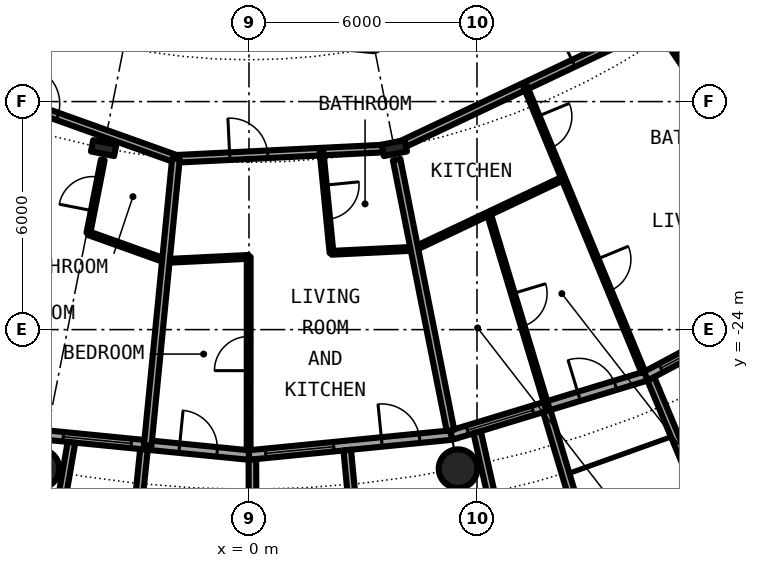
"""IFC4 building model, lengths in metres.
Left out: names, types, materials, properties, quantities, classifications, styles, units other than length and angle.
Written with IfcOpenShell. Run it as: python <this file> out.ifc"""

import sys

from ifc_helpers import new_model, si_unit, direction, frame, frame_2d, origin, origin_2d, place, context, subcontext, project, spatial, rectangle, hollow_circle, i_section, extrude, element, fill, save


model = new_model("IFC4")
c1 = context("Model", 3, precision=1e-05, world=origin(), true_north=direction((0.0, 1.0)))
c2 = subcontext(c1, "Body", "Model", "MODEL_VIEW")
j1 = project(units=[si_unit("LENGTHUNIT", "METRE"), si_unit("PLANEANGLEUNIT", "RADIAN")], contexts=[c1])
p1 = place(None, origin())
s1 = spatial("IfcSite", under=j1, at=p1, CompositionType="ELEMENT")
p2 = place(p1, origin())
s2 = spatial("IfcBuilding", under=s1, at=p2, CompositionType="ELEMENT")
p3 = place(p2, frame((0.0, 0.0, 22.8)))
s3 = spatial("IfcBuildingStorey", under=s2, at=p3, CompositionType="ELEMENT", Elevation=22.8)
for number, where, z_axis, x_axis in (
    (1, (-5.501, -27.658, 0.0), (0.0, 0.0, 1.0), (1.0, 0.0, 0.0)),
    (2, (5.501, -27.658, 0.0), (0.0, 0.0, 1.0), (1.0, 0.0, 0.0)),
):
    element("IfcColumn", number, at=place(p3, frame(where, z_axis=z_axis, x_axis=x_axis)), inside=s3, PredefinedType="COLUMN", context=c2, shape_type="SweptSolid", body=[
        extrude(hollow_circle(Radius=0.508, WallThickness=0.05, at=origin_2d()), origin(), (0.0, 0.0, 1.0), 3.05),
    ])
for number, where, z_axis, x_axis in (
    (3, (-3.824, -19.223, 0.0), (0.0, 0.0, 1.0), (-0.195, -0.981, 0.0)),
    (4, (3.824, -19.223, 0.0), (0.0, 0.0, 1.0), (0.195, -0.981, 0.0)),
):
    element("IfcColumn", number, at=place(p3, frame(where, z_axis=z_axis, x_axis=x_axis)), inside=s3, PredefinedType="COLUMN", context=c2, shape_type="SweptSolid", body=[
        extrude(i_section(OverallWidth=0.305, OverallDepth=0.62, WebThickness=0.021, FlangeThickness=0.04, FilletRadius=0.027, at=origin_2d()), origin(), (0.0, 0.0, 1.0), 3.05),
    ])
p4 = place(p3, frame((-5.326, -26.775, 0.0), z_axis=(0.0, 0.0, 1.0), x_axis=(0.995173996315, -0.098126026407, 0.0)))
e5 = element("IfcWall", 5, at=p4, inside=s3, PredefinedType="SOLIDWALL", context=c2, shape_type="SweptSolid", body=[
    extrude(rectangle(XDim=5.352, YDim=0.25, at=frame_2d((2.676, 0.0))), origin(), (0.0, 0.0, 1.0), 2.7),
])
p5 = place(p4, frame((0.441, 0.0, 0.3)))
e6 = element("IfcOpeningElement", 6, at=p5, cuts=e5, PredefinedType="OPENING", context=c2, shape_type="SweptSolid", body=[
    extrude(rectangle(XDim=1.8, YDim=2.1, at=frame_2d((0.9, 1.05))), frame((0.0, 0.135, 0.0), z_axis=(0.0, -1.0, 0.0), x_axis=(1.0, 0.0, 0.0)), (0.0, 0.0, 1.0), 0.27),
])
p6 = place(p4, frame((3.51, 0.0, 0.0)))
e7 = element("IfcOpeningElement", 7, at=p6, cuts=e5, PredefinedType="OPENING", context=c2, shape_type="SweptSolid", body=[
    extrude(rectangle(XDim=1.0, YDim=2.2, at=frame_2d((0.5, 1.1))), frame((0.0, 0.135, 0.0), z_axis=(0.0, -1.0, 0.0), x_axis=(1.0, 0.0, 0.0)), (0.0, 0.0, 1.0), 0.27),
])
p7 = place(p3, frame((-4.671, -26.966, -0.03), z_axis=(0.0, 0.0, 1.0), x_axis=(-0.170539878907, -0.985350774954, 0.0)))
e8 = element("IfcWall", 8, at=p7, inside=s3, PredefinedType="SOLIDWALL", context=c2, shape_type="SweptSolid", body=[
    extrude(rectangle(XDim=2.932, YDim=0.2, at=frame_2d((1.466, 0.0))), origin(), (0.0, 0.0, 1.0), 2.73),
])
p8 = place(p3, frame((-2.764, -27.153, -0.03), z_axis=(0.0, 0.0, 1.0), x_axis=(-0.101505487237, -0.994834979311, 0.0)))
e9 = element("IfcWall", 9, at=p8, inside=s3, PredefinedType="SOLIDWALL", context=c2, shape_type="SweptSolid", body=[
    extrude(rectangle(XDim=3.007, YDim=0.2, at=frame_2d((1.503, 0.0))), origin(), (0.0, 0.0, 1.0), 2.73),
])
p9 = place(p3, frame((0.0, -27.3, 0.0), z_axis=(0.0, 0.0, 1.0), x_axis=(0.995173996315, 0.098126026407, 0.0)))
e10 = element("IfcWall", 10, at=p9, inside=s3, PredefinedType="SOLIDWALL", context=c2, shape_type="SweptSolid", body=[
    extrude(rectangle(XDim=5.352, YDim=0.25, at=frame_2d((2.676, 0.0))), origin(), (0.0, 0.0, 1.0), 2.7),
])
p10 = place(p9, frame((0.441, 0.0, 0.3)))
e11 = element("IfcOpeningElement", 11, at=p10, cuts=e10, PredefinedType="OPENING", context=c2, shape_type="SweptSolid", body=[
    extrude(rectangle(XDim=1.8, YDim=2.1, at=frame_2d((0.9, 1.05))), frame((0.0, 0.135, 0.0), z_axis=(0.0, -1.0, 0.0), x_axis=(1.0, 0.0, 0.0)), (0.0, 0.0, 1.0), 0.27),
])
p11 = place(p9, frame((3.51, 0.0, 0.0)))
e12 = element("IfcOpeningElement", 12, at=p11, cuts=e10, PredefinedType="OPENING", context=c2, shape_type="SweptSolid", body=[
    extrude(rectangle(XDim=1.0, YDim=2.2, at=frame_2d((0.5, 1.1))), frame((0.0, 0.135, 0.0), z_axis=(0.0, -1.0, 0.0), x_axis=(1.0, 0.0, 0.0)), (0.0, 0.0, 1.0), 0.27),
])
p12 = place(p3, frame((0.09, -27.417, -0.03), z_axis=(0.0, 0.0, 1.0), x_axis=(0.00347308367, -0.999993968827, 0.0)))
e13 = element("IfcWall", 13, at=p12, inside=s3, PredefinedType="SOLIDWALL", context=c2, shape_type="SweptSolid", body=[
    extrude(rectangle(XDim=2.882, YDim=0.2, at=frame_2d((1.441, 0.0))), origin(), (0.0, 0.0, 1.0), 2.73),
])
p13 = place(p3, frame((2.586, -27.171, -0.03), z_axis=(0.0, 0.0, 1.0), x_axis=(0.094548432284, -0.995520262954, 0.0)))
e14 = element("IfcWall", 14, at=p13, inside=s3, PredefinedType="SOLIDWALL", context=c2, shape_type="SweptSolid", body=[
    extrude(rectangle(XDim=3.006, YDim=0.2, at=frame_2d((1.503, 0.0))), origin(), (0.0, 0.0, 1.0), 2.73),
])
p14 = place(p3, frame((5.326, -26.775, 0.0), z_axis=(0.0, 0.0, 1.0), x_axis=(0.956965678721, 0.290201119486, 0.0)))
e15 = element("IfcWall", 15, at=p14, inside=s3, PredefinedType="SOLIDWALL", context=c2, shape_type="SweptSolid", body=[
    extrude(rectangle(XDim=5.351, YDim=0.25, at=frame_2d((2.676, 0.0))), origin(), (0.0, 0.0, 1.0), 2.7),
])
p15 = place(p14, frame((0.441, 0.0, 0.3)))
e16 = element("IfcOpeningElement", 16, at=p15, cuts=e15, PredefinedType="OPENING", context=c2, shape_type="SweptSolid", body=[
    extrude(rectangle(XDim=1.8, YDim=2.1, at=frame_2d((0.9, 1.05))), frame((0.0, 0.135, 0.0), z_axis=(0.0, -1.0, 0.0), x_axis=(1.0, 0.0, 0.0)), (0.0, 0.0, 1.0), 0.27),
])
p16 = place(p14, frame((3.51, 0.0, 0.0)))
e17 = element("IfcOpeningElement", 17, at=p16, cuts=e15, PredefinedType="OPENING", context=c2, shape_type="SweptSolid", body=[
    extrude(rectangle(XDim=1.0, YDim=2.2, at=frame_2d((0.5, 1.1))), frame((0.0, 0.135, 0.0), z_axis=(0.0, -1.0, 0.0), x_axis=(1.0, 0.0, 0.0)), (0.0, 0.0, 1.0), 0.27),
])
p17 = place(p3, frame((6.004, -26.7, -0.03), z_axis=(0.0, 0.0, 1.0), x_axis=(0.219609259383, -0.975587911566, 0.0)))
e18 = element("IfcWall", 18, at=p17, inside=s3, PredefinedType="SOLIDWALL", context=c2, shape_type="SweptSolid", body=[
    extrude(rectangle(XDim=2.933, YDim=0.2, at=frame_2d((1.466, 0.0))), origin(), (0.0, 0.0, 1.0), 2.73),
])
p18 = place(p3, frame((7.837, -26.144, -0.03), z_axis=(0.0, 0.0, 1.0), x_axis=(0.287064767992, -0.957911174889, 0.0)))
e19 = element("IfcWall", 19, at=p18, inside=s3, PredefinedType="SOLIDWALL", context=c2, shape_type="SweptSolid", body=[
    extrude(rectangle(XDim=3.006, YDim=0.2, at=frame_2d((1.503, 0.0))), origin(), (0.0, 0.0, 1.0), 2.73),
])
p19 = place(p3, frame((10.447, -25.222, 0.0), z_axis=(0.0, 0.0, 1.0), x_axis=(0.881915646801, 0.471407246368, 0.0)))
e20 = element("IfcWall", 20, at=p19, inside=s3, PredefinedType="SOLIDWALL", context=c2, shape_type="SweptSolid", body=[
    extrude(rectangle(XDim=5.352, YDim=0.25, at=frame_2d((2.676, 0.0))), origin(), (0.0, 0.0, 1.0), 2.7),
])
p20 = place(p19, frame((0.441, 0.0, 0.3)))
e21 = element("IfcOpeningElement", 21, at=p20, cuts=e20, PredefinedType="OPENING", context=c2, shape_type="SweptSolid", body=[
    extrude(rectangle(XDim=1.8, YDim=2.1, at=frame_2d((0.9, 1.05))), frame((0.0, 0.135, 0.0), z_axis=(0.0, -1.0, 0.0), x_axis=(1.0, 0.0, 0.0)), (0.0, 0.0, 1.0), 0.27),
])
p21 = place(p19, frame((3.51, 0.0, 0.0)))
e22 = element("IfcOpeningElement", 22, at=p21, cuts=e20, PredefinedType="OPENING", context=c2, shape_type="SweptSolid", body=[
    extrude(rectangle(XDim=1.0, YDim=2.2, at=frame_2d((0.5, 1.1))), frame((0.0, 0.135, 0.0), z_axis=(0.0, -1.0, 0.0), x_axis=(1.0, 0.0, 0.0)), (0.0, 0.0, 1.0), 0.27),
])
p22 = place(p3, frame((10.575, -25.295, -0.03), z_axis=(0.0, 0.0, 1.0), x_axis=(0.385697364644, -0.922625353492, 0.0)))
e23 = element("IfcWall", 23, at=p22, inside=s3, PredefinedType="SOLIDWALL", context=c2, shape_type="SweptSolid", body=[
    extrude(rectangle(XDim=2.883, YDim=0.2, at=frame_2d((1.442, 0.0))), origin(), (0.0, 0.0, 1.0), 2.73),
])
for number, where, z_axis, x_axis in (
    (24, (-2.186, -22.193, 0.0), (0.0, 0.0, 1.0), (0.999, 0.049, 0.0)),
    (25, (2.172, -21.979, 0.0), (0.0, 0.0, 1.0), (0.999, 0.049, 0.0)),
):
    element("IfcWall", number, at=place(p3, frame(where, z_axis=z_axis, x_axis=x_axis)), inside=s3, PredefinedType="PARTITIONING", context=c2, shape_type="SweptSolid", body=[
        extrude(rectangle(XDim=2.182, YDim=0.1, at=frame_2d((1.091, 0.0))), origin(), (0.0, 0.0, 1.0), 2.7),
    ])
p23 = place(p3, frame((-4.216, -21.466, 0.0), z_axis=(0.0, 0.0, 1.0), x_axis=(0.941588922545, -0.33676445914, 0.0)))
e26 = element("IfcWall", 26, at=p23, inside=s3, PredefinedType="PARTITIONING", context=c2, shape_type="SweptSolid", body=[
    extrude(rectangle(XDim=2.168, YDim=0.1, at=frame_2d((1.084, 0.0))), origin(), (0.0, 0.0, 1.0), 2.7),
])
p24 = place(p3, frame((4.352, -21.873, 0.0), z_axis=(0.0, 0.0, 1.0), x_axis=(0.903905215872, 0.427732814639, 0.0)))
e27 = element("IfcWall", 27, at=p24, inside=s3, PredefinedType="PARTITIONING", context=c2, shape_type="SweptSolid", body=[
    extrude(rectangle(XDim=4.334, YDim=0.1, at=frame_2d((2.167, 0.0))), origin(), (0.0, 0.0, 1.0), 2.7),
])
p25 = place(p3, frame((-1.921, -19.506, 0.0), z_axis=(0.0, 0.0, 1.0), x_axis=(0.99878260749, 0.04932852092, 0.0)))
e28 = element("IfcWall", 28, at=p25, inside=s3, PredefinedType="PARTITIONING", context=c2, shape_type="SweptSolid", body=[
    extrude(rectangle(XDim=5.598, YDim=0.2, at=frame_2d((2.799, 0.0))), origin(), (0.0, 0.0, 1.0), 2.38),
])
p26 = place(p25, frame((1.417, 0.0, 0.0)))
e29 = element("IfcOpeningElement", 29, at=p26, cuts=e28, PredefinedType="OPENING", context=c2, shape_type="SweptSolid", body=[
    extrude(rectangle(XDim=1.0, YDim=2.3, at=frame_2d((0.5, 1.15))), frame((0.0, 0.11, 0.0), z_axis=(0.0, -1.0, 0.0), x_axis=(1.0, 0.0, 0.0)), (0.0, 0.0, 1.0), 0.22),
])
p27 = place(p3, frame((-10.741, -16.35, 0.0), z_axis=(0.0, 0.0, 1.0), x_axis=(0.941539496009, -0.336902623105, 0.0)))
e30 = element("IfcWall", 30, at=p27, inside=s3, PredefinedType="PARTITIONING", context=c2, shape_type="SweptSolid", body=[
    extrude(rectangle(XDim=9.368, YDim=0.2, at=frame_2d((4.684, 0.0))), origin(), (0.0, 0.0, 1.0), 2.38),
])
p28 = place(p27, frame((5.057, 0.0, 0.0)))
e31 = element("IfcOpeningElement", 31, at=p28, cuts=e30, PredefinedType="OPENING", context=c2, shape_type="SweptSolid", body=[
    extrude(rectangle(XDim=1.0, YDim=2.3, at=frame_2d((0.5, 1.15))), frame((0.0, 0.11, 0.0), z_axis=(0.0, -1.0, 0.0), x_axis=(1.0, 0.0, 0.0)), (0.0, 0.0, 1.0), 0.22),
])
p29 = place(p3, frame((3.966, -19.156, 0.0), z_axis=(0.0, 0.0, 1.0), x_axis=(0.90398275529, 0.427568916244, 0.0)))
e32 = element("IfcWall", 32, at=p29, inside=s3, PredefinedType="PARTITIONING", context=c2, shape_type="SweptSolid", body=[
    extrude(rectangle(XDim=9.372, YDim=0.2, at=frame_2d((4.686, 0.0))), origin(), (0.0, 0.0, 1.0), 2.38),
])
p30 = place(p29, frame((5.058, 0.0, 0.0)))
e33 = element("IfcOpeningElement", 33, at=p30, cuts=e32, PredefinedType="OPENING", context=c2, shape_type="SweptSolid", body=[
    extrude(rectangle(XDim=1.0, YDim=2.3, at=frame_2d((0.5, 1.15))), frame((0.0, 0.11, 0.0), z_axis=(0.0, -1.0, 0.0), x_axis=(1.0, 0.0, 0.0)), (0.0, 0.0, 1.0), 0.22),
])
p31 = place(p3, frame((-4.226, -21.462, 0.0), z_axis=(0.0, 0.0, 1.0), x_axis=(0.193055213522, 0.981187894611, 0.0)))
e34 = element("IfcWall", 34, at=p31, inside=s3, PredefinedType="PARTITIONING", context=c2, shape_type="SweptSolid", body=[
    extrude(rectangle(XDim=1.964, YDim=0.1, at=frame_2d((0.982, 0.0))), origin(), (0.0, 0.0, 1.0), 2.7),
])
p32 = place(p31, frame((0.6, 0.0, 0.0)))
e35 = element("IfcOpeningElement", 35, at=p32, cuts=e34, PredefinedType="OPENING", context=c2, shape_type="SweptSolid", body=[
    extrude(rectangle(XDim=0.9, YDim=2.3, at=frame_2d((0.45, 1.15))), frame((0.0, 0.06, 0.0), z_axis=(0.0, -1.0, 0.0), x_axis=(1.0, 0.0, 0.0)), (0.0, 0.0, 1.0), 0.12),
])
p33 = place(p3, frame((-2.665, -27.044, 0.0), z_axis=(0.0, 0.0, 1.0), x_axis=(0.098083473227, 0.99517819122, 0.0)))
e36 = element("IfcWall", 36, at=p33, inside=s3, PredefinedType="PARTITIONING", context=c2, shape_type="SweptSolid", body=[
    extrude(rectangle(XDim=7.574, YDim=0.2, at=frame_2d((3.787, 0.0))), origin(), (0.0, 0.0, 1.0), 2.7),
])
p34 = place(p3, frame((-0.009, -27.175, 0.0), z_axis=(0.0, 0.0, 1.0), x_axis=(0.000383785052, 0.999999926355, 0.0)))
e37 = element("IfcWall", 37, at=p34, inside=s3, PredefinedType="PARTITIONING", context=c2, shape_type="SweptSolid", body=[
    extrude(rectangle(XDim=5.089, YDim=0.1, at=frame_2d((2.544, 0.0))), origin(), (0.0, 0.0, 1.0), 2.7),
])
p35 = place(p34, frame((2.095, 0.0, 0.0)))
e38 = element("IfcOpeningElement", 38, at=p35, cuts=e37, PredefinedType="OPENING", context=c2, shape_type="SweptSolid", body=[
    extrude(rectangle(XDim=0.9, YDim=2.3, at=frame_2d((0.45, 1.15))), frame((0.0, 0.06, 0.0), z_axis=(0.0, -1.0, 0.0), x_axis=(1.0, 0.0, 0.0)), (0.0, 0.0, 1.0), 0.12),
])
p36 = place(p3, frame((1.909, -19.317, 0.0), z_axis=(0.0, 0.0, 1.0), x_axis=(0.098383180323, -0.995148606907, 0.0)))
e39 = element("IfcWall", 39, at=p36, inside=s3, PredefinedType="PARTITIONING", context=c2, shape_type="SweptSolid", body=[
    extrude(rectangle(XDim=2.675, YDim=0.1, at=frame_2d((1.337, 0.0))), origin(), (0.0, 0.0, 1.0), 2.7),
])
p37 = place(p36, frame((0.887, 0.0, 0.0)))
e40 = element("IfcOpeningElement", 40, at=p37, cuts=e39, PredefinedType="OPENING", context=c2, shape_type="SweptSolid", body=[
    extrude(rectangle(XDim=0.9, YDim=2.3, at=frame_2d((0.45, 1.15))), frame((0.0, 0.06, 0.0), z_axis=(0.0, -1.0, 0.0), x_axis=(1.0, 0.0, 0.0)), (0.0, 0.0, 1.0), 0.12),
])
p38 = place(p3, frame((3.885, -19.527, 0.0), z_axis=(0.0, 0.0, 1.0), x_axis=(0.195159680851, -0.980771481524, 0.0)))
e41 = element("IfcWall", 41, at=p38, inside=s3, PredefinedType="PARTITIONING", context=c2, shape_type="SweptSolid", body=[
    extrude(rectangle(XDim=7.266, YDim=0.2, at=frame_2d((3.633, 0.0))), origin(), (0.0, 0.0, 1.0), 2.7),
])
p39 = place(p3, frame((6.31, -20.945, 0.0), z_axis=(0.0, 0.0, 1.0), x_axis=(0.288484435279, -0.957484585047, 0.0)))
e42 = element("IfcWall", 42, at=p39, inside=s3, PredefinedType="PARTITIONING", context=c2, shape_type="SweptSolid", body=[
    extrude(rectangle(XDim=5.3, YDim=0.1, at=frame_2d((2.65, 0.0))), origin(), (0.0, 0.0, 1.0), 2.7),
])
p40 = place(p39, frame((2.2, 0.0, 0.0)))
e43 = element("IfcOpeningElement", 43, at=p40, cuts=e42, PredefinedType="OPENING", context=c2, shape_type="SweptSolid", body=[
    extrude(rectangle(XDim=0.9, YDim=2.3, at=frame_2d((0.45, 1.15))), frame((0.0, 0.06, 0.0), z_axis=(0.0, -1.0, 0.0), x_axis=(1.0, 0.0, 0.0)), (0.0, 0.0, 1.0), 0.12),
])
p41 = place(p3, frame((7.268, -17.594, 0.0), z_axis=(0.0, 0.0, 1.0), x_axis=(0.381763497026, -0.924260045841, 0.0)))
e44 = element("IfcWall", 44, at=p41, inside=s3, PredefinedType="PARTITIONING", context=c2, shape_type="SweptSolid", body=[
    extrude(rectangle(XDim=8.138, YDim=0.1, at=frame_2d((4.069, 0.0))), origin(), (0.0, 0.0, 1.0), 2.7),
])
p42 = place(p41, frame((0.861, 0.0, 0.0)))
e45 = element("IfcOpeningElement", 45, at=p42, cuts=e44, PredefinedType="OPENING", context=c2, shape_type="SweptSolid", body=[
    extrude(rectangle(XDim=0.9, YDim=2.3, at=frame_2d((0.45, 1.15))), frame((0.0, 0.06, 0.0), z_axis=(0.0, -1.0, 0.0), x_axis=(1.0, 0.0, 0.0)), (0.0, 0.0, 1.0), 0.12),
])
p43 = place(p41, frame((4.93, 0.0, 0.0)))
e46 = element("IfcOpeningElement", 46, at=p43, cuts=e44, PredefinedType="OPENING", context=c2, shape_type="SweptSolid", body=[
    extrude(rectangle(XDim=0.9, YDim=2.3, at=frame_2d((0.45, 1.15))), frame((0.0, 0.06, 0.0), z_axis=(0.0, -1.0, 0.0), x_axis=(1.0, 0.0, 0.0)), (0.0, 0.0, 1.0), 0.12),
])
p44 = place(p3, frame((11.093, -16.533, 0.0), z_axis=(0.0, 0.0, 1.0), x_axis=(0.557134474719, -0.830422288405, 0.0)))
e47 = element("IfcWall", 47, at=p44, inside=s3, PredefinedType="PARTITIONING", context=c2, shape_type="SweptSolid", body=[
    extrude(rectangle(XDim=1.965, YDim=0.1, at=frame_2d((0.983, 0.0))), origin(), (0.0, 0.0, 1.0), 2.7),
])
p45 = place(p44, frame((0.366, 0.0, 0.0)))
e48 = element("IfcOpeningElement", 48, at=p45, cuts=e47, PredefinedType="OPENING", context=c2, shape_type="SweptSolid", body=[
    extrude(rectangle(XDim=0.9, YDim=2.3, at=frame_2d((0.45, 1.15))), frame((0.0, 0.06, 0.0), z_axis=(0.0, -1.0, 0.0), x_axis=(1.0, 0.0, 0.0)), (0.0, 0.0, 1.0), 0.12),
])
p46 = place(p5, origin())
e49 = element("IfcWindow", 49, at=p46, inside=s3, PartitioningType="SINGLE_PANEL", PredefinedType="WINDOW", context=c2, shape_type="SweptSolid", body=[
    extrude(rectangle(XDim=1.8, YDim=2.1, at=frame_2d((0.9, 1.05))), frame((0.0, 0.03, 0.0), z_axis=(0.0, -1.0, 0.0), x_axis=(1.0, 0.0, 0.0)), (0.0, 0.0, 1.0), 0.06),
])
fill(e6, e49)
p47 = place(p6, origin())
e50 = element("IfcDoor", 50, at=p47, inside=s3, OperationType="SINGLE_SWING_LEFT", PredefinedType="DOOR", context=c2, shape_type="SweptSolid", body=[
    extrude(rectangle(XDim=1.0, YDim=2.2, at=frame_2d((0.5, 1.1))), frame((0.0, 0.025, 0.0), z_axis=(0.0, -1.0, 0.0), x_axis=(1.0, 0.0, 0.0)), (0.0, 0.0, 1.0), 0.05),
])
fill(e7, e50)
p48 = place(p10, origin())
e51 = element("IfcWindow", 51, at=p48, inside=s3, PartitioningType="SINGLE_PANEL", PredefinedType="WINDOW", context=c2, shape_type="SweptSolid", body=[
    extrude(rectangle(XDim=1.8, YDim=2.1, at=frame_2d((0.9, 1.05))), frame((0.0, 0.03, 0.0), z_axis=(0.0, -1.0, 0.0), x_axis=(1.0, 0.0, 0.0)), (0.0, 0.0, 1.0), 0.06),
])
fill(e11, e51)
p49 = place(p11, origin())
e52 = element("IfcDoor", 52, at=p49, inside=s3, OperationType="SINGLE_SWING_LEFT", PredefinedType="DOOR", context=c2, shape_type="SweptSolid", body=[
    extrude(rectangle(XDim=1.0, YDim=2.2, at=frame_2d((0.5, 1.1))), frame((0.0, 0.025, 0.0), z_axis=(0.0, -1.0, 0.0), x_axis=(1.0, 0.0, 0.0)), (0.0, 0.0, 1.0), 0.05),
])
fill(e12, e52)
p50 = place(p15, origin())
e53 = element("IfcWindow", 53, at=p50, inside=s3, PartitioningType="SINGLE_PANEL", PredefinedType="WINDOW", context=c2, shape_type="SweptSolid", body=[
    extrude(rectangle(XDim=1.8, YDim=2.1, at=frame_2d((0.9, 1.05))), frame((0.0, 0.03, 0.0), z_axis=(0.0, -1.0, 0.0), x_axis=(1.0, 0.0, 0.0)), (0.0, 0.0, 1.0), 0.06),
])
fill(e16, e53)
p51 = place(p16, origin())
e54 = element("IfcDoor", 54, at=p51, inside=s3, OperationType="SINGLE_SWING_LEFT", PredefinedType="DOOR", context=c2, shape_type="SweptSolid", body=[
    extrude(rectangle(XDim=1.0, YDim=2.2, at=frame_2d((0.5, 1.1))), frame((0.0, 0.025, 0.0), z_axis=(0.0, -1.0, 0.0), x_axis=(1.0, 0.0, 0.0)), (0.0, 0.0, 1.0), 0.05),
])
fill(e17, e54)
p52 = place(p20, origin())
e55 = element("IfcWindow", 55, at=p52, inside=s3, PartitioningType="SINGLE_PANEL", PredefinedType="WINDOW", context=c2, shape_type="SweptSolid", body=[
    extrude(rectangle(XDim=1.8, YDim=2.1, at=frame_2d((0.9, 1.05))), frame((0.0, 0.03, 0.0), z_axis=(0.0, -1.0, 0.0), x_axis=(1.0, 0.0, 0.0)), (0.0, 0.0, 1.0), 0.06),
])
fill(e21, e55)
p53 = place(p28, origin())
e56 = element("IfcDoor", 56, at=p53, inside=s3, OperationType="SINGLE_SWING_RIGHT", PredefinedType="DOOR", context=c2, shape_type="SweptSolid", body=[
    extrude(rectangle(XDim=1.0, YDim=2.3, at=frame_2d((0.5, 1.15))), frame((0.0, 0.025, 0.0), z_axis=(0.0, -1.0, 0.0), x_axis=(1.0, 0.0, 0.0)), (0.0, 0.0, 1.0), 0.05),
])
fill(e31, e56)
p54 = place(p32, origin())
e57 = element("IfcDoor", 57, at=p54, inside=s3, OperationType="SINGLE_SWING_RIGHT", PredefinedType="DOOR", context=c2, shape_type="SweptSolid", body=[
    extrude(rectangle(XDim=0.9, YDim=2.3, at=frame_2d((0.45, 1.15))), frame((0.0, 0.025, 0.0), z_axis=(0.0, -1.0, 0.0), x_axis=(1.0, 0.0, 0.0)), (0.0, 0.0, 1.0), 0.05),
])
fill(e35, e57)
p55 = place(p26, origin())
e58 = element("IfcDoor", 58, at=p55, inside=s3, OperationType="SINGLE_SWING_LEFT", PredefinedType="DOOR", context=c2, shape_type="SweptSolid", body=[
    extrude(rectangle(XDim=1.0, YDim=2.3, at=frame_2d((0.5, 1.15))), frame((0.0, 0.025, 0.0), z_axis=(0.0, -1.0, 0.0), x_axis=(1.0, 0.0, 0.0)), (0.0, 0.0, 1.0), 0.05),
])
fill(e29, e58)
p56 = place(p37, origin())
e59 = element("IfcDoor", 59, at=p56, inside=s3, OperationType="SINGLE_SWING_RIGHT", PredefinedType="DOOR", context=c2, shape_type="SweptSolid", body=[
    extrude(rectangle(XDim=0.9, YDim=2.3, at=frame_2d((0.45, 1.15))), frame((0.0, 0.025, 0.0), z_axis=(0.0, -1.0, 0.0), x_axis=(1.0, 0.0, 0.0)), (0.0, 0.0, 1.0), 0.05),
])
fill(e40, e59)
p57 = place(p35, origin())
e60 = element("IfcDoor", 60, at=p57, inside=s3, OperationType="SINGLE_SWING_LEFT", PredefinedType="DOOR", context=c2, shape_type="SweptSolid", body=[
    extrude(rectangle(XDim=0.9, YDim=2.3, at=frame_2d((0.45, 1.15))), frame((0.0, 0.025, 0.0), z_axis=(0.0, -1.0, 0.0), x_axis=(1.0, 0.0, 0.0)), (0.0, 0.0, 1.0), 0.05),
])
fill(e38, e60)
p58 = place(p30, origin())
e61 = element("IfcDoor", 61, at=p58, inside=s3, OperationType="SINGLE_SWING_RIGHT", PredefinedType="DOOR", context=c2, shape_type="SweptSolid", body=[
    extrude(rectangle(XDim=1.0, YDim=2.3, at=frame_2d((0.5, 1.15))), frame((0.0, 0.025, 0.0), z_axis=(0.0, -1.0, 0.0), x_axis=(1.0, 0.0, 0.0)), (0.0, 0.0, 1.0), 0.05),
])
fill(e33, e61)
p59 = place(p45, origin())
e62 = element("IfcDoor", 62, at=p59, inside=s3, OperationType="SINGLE_SWING_LEFT", PredefinedType="DOOR", context=c2, shape_type="SweptSolid", body=[
    extrude(rectangle(XDim=0.9, YDim=2.3, at=frame_2d((0.45, 1.15))), frame((0.0, 0.025, 0.0), z_axis=(0.0, -1.0, 0.0), x_axis=(1.0, 0.0, 0.0)), (0.0, 0.0, 1.0), 0.05),
])
fill(e48, e62)
p60 = place(p42, origin())
e63 = element("IfcDoor", 63, at=p60, inside=s3, OperationType="SINGLE_SWING_LEFT", PredefinedType="DOOR", context=c2, shape_type="SweptSolid", body=[
    extrude(rectangle(XDim=0.9, YDim=2.3, at=frame_2d((0.45, 1.15))), frame((0.0, 0.025, 0.0), z_axis=(0.0, -1.0, 0.0), x_axis=(1.0, 0.0, 0.0)), (0.0, 0.0, 1.0), 0.05),
])
fill(e45, e63)
p61 = place(p43, origin())
e64 = element("IfcDoor", 64, at=p61, inside=s3, OperationType="SINGLE_SWING_RIGHT", PredefinedType="DOOR", context=c2, shape_type="SweptSolid", body=[
    extrude(rectangle(XDim=0.9, YDim=2.3, at=frame_2d((0.45, 1.15))), frame((0.0, 0.025, 0.0), z_axis=(0.0, -1.0, 0.0), x_axis=(1.0, 0.0, 0.0)), (0.0, 0.0, 1.0), 0.05),
])
fill(e46, e64)
p62 = place(p40, origin())
e65 = element("IfcDoor", 65, at=p62, inside=s3, OperationType="SINGLE_SWING_RIGHT", PredefinedType="DOOR", context=c2, shape_type="SweptSolid", body=[
    extrude(rectangle(XDim=0.9, YDim=2.3, at=frame_2d((0.45, 1.15))), frame((0.0, 0.025, 0.0), z_axis=(0.0, -1.0, 0.0), x_axis=(1.0, 0.0, 0.0)), (0.0, 0.0, 1.0), 0.05),
])
fill(e43, e65)
save(model, sys.argv[1])
